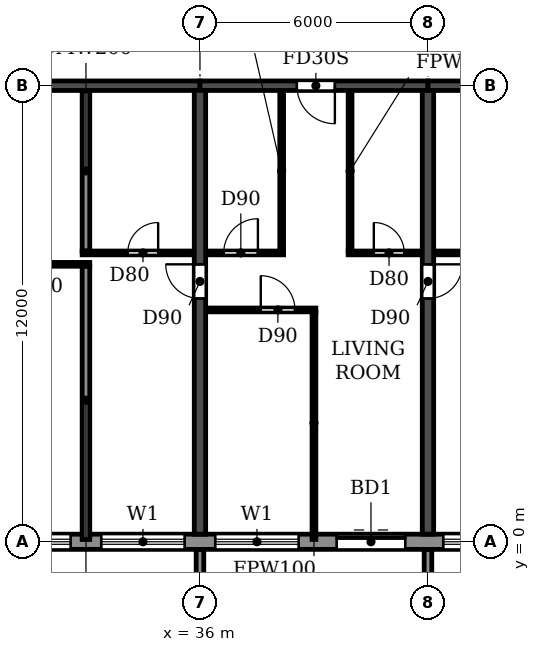
"""IFC4 building model, lengths in metres.
Left out: names, types, materials, properties, quantities, classifications, styles, units other than length and angle.
Written with IfcOpenShell. Run it as: python <this file> out.ifc"""

import sys

from ifc_helpers import new_model, si_unit, direction, frame, frame_2d, origin, place, context, subcontext, project, spatial, polyline, rectangle, outline, extrude, source, transform, mapped, element, fill, save


model = new_model("IFC4")
c1 = context("Model", 3, precision=1e-05, world=origin(), true_north=direction((0.0, 1.0)))
c2 = subcontext(c1, "Body", "Model", "MODEL_VIEW")
j1 = project(units=[si_unit("LENGTHUNIT", "METRE"), si_unit("PLANEANGLEUNIT", "RADIAN")], contexts=[c1])
p1 = place(None, origin())
s1 = spatial("IfcSite", under=j1, at=p1, CompositionType="ELEMENT")
p2 = place(p1, origin())
s2 = spatial("IfcBuilding", under=s1, at=p2, CompositionType="ELEMENT")
p3 = place(p2, frame((0.0, 0.0, 155.4)))
s3 = spatial("IfcBuildingStorey", under=s2, at=p3, CompositionType="ELEMENT", Elevation=155.4)
p4 = place(p3, frame((36.0, 0.2, 0.0), z_axis=(0.0, 0.0, 1.0), x_axis=(0.0, 1.0, 0.0)))
e1 = element("IfcWall", 1, at=p4, inside=s3, PredefinedType="SHEAR", context=c2, shape_type="SweptSolid", body=[
    extrude(rectangle(XDim=11.675, YDim=0.3, at=frame_2d((5.837, 0.0))), origin(), (0.0, 0.0, 1.0), 3.0),
])
p5 = place(p4, frame((6.2, 0.0, 0.0)))
e2 = element("IfcOpeningElement", 2, at=p5, cuts=e1, PredefinedType="OPENING", context=c2, shape_type="SweptSolid", body=[
    extrude(rectangle(XDim=0.9, YDim=2.1, at=frame_2d((0.45, 1.05))), frame((0.0, 0.16, 0.0), z_axis=(0.0, -1.0, 0.0), x_axis=(1.0, 0.0, 0.0)), (0.0, 0.0, 1.0), 0.32),
])
p6 = place(p3, frame((42.0, 0.2, 0.0), z_axis=(0.0, 0.0, 1.0), x_axis=(0.0, 1.0, 0.0)))
e3 = element("IfcWall", 3, at=p6, inside=s3, PredefinedType="SHEAR", context=c2, shape_type="SweptSolid", body=[
    extrude(rectangle(XDim=11.675, YDim=0.3, at=frame_2d((5.837, 0.0))), origin(), (0.0, 0.0, 1.0), 3.0),
])
p7 = place(p6, frame((6.2, 0.0, 0.0)))
e4 = element("IfcOpeningElement", 4, at=p7, cuts=e3, PredefinedType="OPENING", context=c2, shape_type="SweptSolid", body=[
    extrude(rectangle(XDim=0.9, YDim=2.1, at=frame_2d((0.45, 1.05))), frame((0.0, 0.16, 0.0), z_axis=(0.0, -1.0, 0.0), x_axis=(1.0, 0.0, 0.0)), (0.0, 0.0, 1.0), 0.32),
])
p8 = place(p3, frame((30.0, 12.0, 0.0), z_axis=(0.0, 0.0, 1.0), x_axis=(1.0, 0.0, 0.0)))
e5 = element("IfcWall", 5, at=p8, inside=s3, PredefinedType="SHEAR", context=c2, shape_type="SweptSolid", body=[
    extrude(rectangle(XDim=6.0, YDim=0.25, at=frame_2d((3.0, 0.0))), origin(), (0.0, 0.0, 1.0), 2.4),
])
p9 = place(p3, frame((36.0, 12.0, 0.0), z_axis=(0.0, 0.0, 1.0), x_axis=(1.0, 0.0, 0.0)))
e6 = element("IfcWall", 6, at=p9, inside=s3, PredefinedType="SHEAR", context=c2, shape_type="SweptSolid", body=[
    extrude(rectangle(XDim=6.0, YDim=0.25, at=frame_2d((3.0, 0.0))), origin(), (0.0, 0.0, 1.0), 2.4),
])
p10 = place(p9, frame((2.55, 0.0, 0.0)))
e7 = element("IfcOpeningElement", 7, at=p10, cuts=e6, PredefinedType="OPENING", context=c2, shape_type="SweptSolid", body=[
    extrude(rectangle(XDim=1.0, YDim=2.1, at=frame_2d((0.5, 1.05))), frame((0.0, 0.135, 0.0), z_axis=(0.0, -1.0, 0.0), x_axis=(1.0, 0.0, 0.0)), (0.0, 0.0, 1.0), 0.27),
])
p11 = place(p3, frame((42.0, 12.0, 0.0), z_axis=(0.0, 0.0, 1.0), x_axis=(1.0, 0.0, 0.0)))
e8 = element("IfcWall", 8, at=p11, inside=s3, PredefinedType="SHEAR", context=c2, shape_type="SweptSolid", body=[
    extrude(rectangle(XDim=6.0, YDim=0.25, at=frame_2d((3.0, 0.0))), origin(), (0.0, 0.0, 1.0), 2.4),
])
p12 = place(p3, frame((16.683, 0.0, 0.0), z_axis=(0.0, 0.0, 1.0), x_axis=(1.0, 0.0, 0.0)))
e9 = element("IfcWall", 9, at=p12, inside=s3, PredefinedType="STANDARD", context=c2, shape_type="SweptSolid", body=[
    extrude(rectangle(XDim=68.634, YDim=0.4, at=frame_2d((34.317, 0.0))), origin(), (0.0, 0.0, 1.0), 3.0),
])
p13 = place(p12, frame((1.717, 0.0, 0.9)))
e10 = element("IfcOpeningElement", 10, at=p13, cuts=e9, PredefinedType="OPENING", context=c2, shape_type="SweptSolid", body=[
    extrude(rectangle(XDim=2.2, YDim=1.5, at=frame_2d((1.1, 0.75))), frame((0.0, 0.21, 0.0), z_axis=(0.0, -1.0, 0.0), x_axis=(1.0, 0.0, 0.0)), (0.0, 0.0, 1.0), 0.42),
])
p14 = place(p12, frame((4.717, 0.0, 0.9)))
e11 = element("IfcOpeningElement", 11, at=p14, cuts=e9, PredefinedType="OPENING", context=c2, shape_type="SweptSolid", body=[
    extrude(rectangle(XDim=2.2, YDim=1.5, at=frame_2d((1.1, 0.75))), frame((0.0, 0.21, 0.0), z_axis=(0.0, -1.0, 0.0), x_axis=(1.0, 0.0, 0.0)), (0.0, 0.0, 1.0), 0.42),
])
p15 = place(p12, frame((7.917, 0.0, 0.0)))
e12 = element("IfcOpeningElement", 12, at=p15, cuts=e9, PredefinedType="OPENING", context=c2, shape_type="SweptSolid", body=[
    extrude(rectangle(XDim=1.8, YDim=2.4, at=frame_2d((0.9, 1.2))), frame((0.0, 0.21, 0.0), z_axis=(0.0, -1.0, 0.0), x_axis=(1.0, 0.0, 0.0)), (0.0, 0.0, 1.0), 0.42),
])
p16 = place(p12, frame((10.717, 0.0, 0.9)))
e13 = element("IfcOpeningElement", 13, at=p16, cuts=e9, PredefinedType="OPENING", context=c2, shape_type="SweptSolid", body=[
    extrude(rectangle(XDim=2.2, YDim=1.5, at=frame_2d((1.1, 0.75))), frame((0.0, 0.21, 0.0), z_axis=(0.0, -1.0, 0.0), x_axis=(1.0, 0.0, 0.0)), (0.0, 0.0, 1.0), 0.42),
])
p17 = place(p12, frame((13.717, 0.0, 0.9)))
e14 = element("IfcOpeningElement", 14, at=p17, cuts=e9, PredefinedType="OPENING", context=c2, shape_type="SweptSolid", body=[
    extrude(rectangle(XDim=2.2, YDim=1.5, at=frame_2d((1.1, 0.75))), frame((0.0, 0.21, 0.0), z_axis=(0.0, -1.0, 0.0), x_axis=(1.0, 0.0, 0.0)), (0.0, 0.0, 1.0), 0.42),
])
p18 = place(p12, frame((16.717, 0.0, 0.9)))
e15 = element("IfcOpeningElement", 15, at=p18, cuts=e9, PredefinedType="OPENING", context=c2, shape_type="SweptSolid", body=[
    extrude(rectangle(XDim=2.2, YDim=1.5, at=frame_2d((1.1, 0.75))), frame((0.0, 0.21, 0.0), z_axis=(0.0, -1.0, 0.0), x_axis=(1.0, 0.0, 0.0)), (0.0, 0.0, 1.0), 0.42),
])
p19 = place(p12, frame((19.717, 0.0, 0.9)))
e16 = element("IfcOpeningElement", 16, at=p19, cuts=e9, PredefinedType="OPENING", context=c2, shape_type="SweptSolid", body=[
    extrude(rectangle(XDim=2.2, YDim=1.5, at=frame_2d((1.1, 0.75))), frame((0.0, 0.21, 0.0), z_axis=(0.0, -1.0, 0.0), x_axis=(1.0, 0.0, 0.0)), (0.0, 0.0, 1.0), 0.42),
])
p20 = place(p12, frame((22.917, 0.0, 0.0)))
e17 = element("IfcOpeningElement", 17, at=p20, cuts=e9, PredefinedType="OPENING", context=c2, shape_type="SweptSolid", body=[
    extrude(rectangle(XDim=1.8, YDim=2.4, at=frame_2d((0.9, 1.2))), frame((0.0, 0.21, 0.0), z_axis=(0.0, -1.0, 0.0), x_axis=(1.0, 0.0, 0.0)), (0.0, 0.0, 1.0), 0.42),
])
p21 = place(p12, frame((25.717, 0.0, 0.9)))
e18 = element("IfcOpeningElement", 18, at=p21, cuts=e9, PredefinedType="OPENING", context=c2, shape_type="SweptSolid", body=[
    extrude(rectangle(XDim=2.2, YDim=1.5, at=frame_2d((1.1, 0.75))), frame((0.0, 0.21, 0.0), z_axis=(0.0, -1.0, 0.0), x_axis=(1.0, 0.0, 0.0)), (0.0, 0.0, 1.0), 0.42),
])
p22 = place(p12, frame((28.717, 0.0, 0.9)))
e19 = element("IfcOpeningElement", 19, at=p22, cuts=e9, PredefinedType="OPENING", context=c2, shape_type="SweptSolid", body=[
    extrude(rectangle(XDim=2.2, YDim=1.5, at=frame_2d((1.1, 0.75))), frame((0.0, 0.21, 0.0), z_axis=(0.0, -1.0, 0.0), x_axis=(1.0, 0.0, 0.0)), (0.0, 0.0, 1.0), 0.42),
])
p23 = place(p12, frame((31.917, 0.0, 0.0)))
e20 = element("IfcOpeningElement", 20, at=p23, cuts=e9, PredefinedType="OPENING", context=c2, shape_type="SweptSolid", body=[
    extrude(rectangle(XDim=1.8, YDim=2.4, at=frame_2d((0.9, 1.2))), frame((0.0, 0.21, 0.0), z_axis=(0.0, -1.0, 0.0), x_axis=(1.0, 0.0, 0.0)), (0.0, 0.0, 1.0), 0.42),
])
p24 = place(p12, frame((34.717, 0.0, 0.9)))
e21 = element("IfcOpeningElement", 21, at=p24, cuts=e9, PredefinedType="OPENING", context=c2, shape_type="SweptSolid", body=[
    extrude(rectangle(XDim=2.2, YDim=1.5, at=frame_2d((1.1, 0.75))), frame((0.0, 0.21, 0.0), z_axis=(0.0, -1.0, 0.0), x_axis=(1.0, 0.0, 0.0)), (0.0, 0.0, 1.0), 0.42),
])
p25 = place(p12, frame((37.717, 0.0, 0.9)))
e22 = element("IfcOpeningElement", 22, at=p25, cuts=e9, PredefinedType="OPENING", context=c2, shape_type="SweptSolid", body=[
    extrude(rectangle(XDim=2.2, YDim=1.5, at=frame_2d((1.1, 0.75))), frame((0.0, 0.21, 0.0), z_axis=(0.0, -1.0, 0.0), x_axis=(1.0, 0.0, 0.0)), (0.0, 0.0, 1.0), 0.42),
])
p26 = place(p12, frame((40.717, 0.0, 0.9)))
e23 = element("IfcOpeningElement", 23, at=p26, cuts=e9, PredefinedType="OPENING", context=c2, shape_type="SweptSolid", body=[
    extrude(rectangle(XDim=2.2, YDim=1.5, at=frame_2d((1.1, 0.75))), frame((0.0, 0.21, 0.0), z_axis=(0.0, -1.0, 0.0), x_axis=(1.0, 0.0, 0.0)), (0.0, 0.0, 1.0), 0.42),
])
p27 = place(p12, frame((43.717, 0.0, 0.9)))
e24 = element("IfcOpeningElement", 24, at=p27, cuts=e9, PredefinedType="OPENING", context=c2, shape_type="SweptSolid", body=[
    extrude(rectangle(XDim=2.2, YDim=1.5, at=frame_2d((1.1, 0.75))), frame((0.0, 0.21, 0.0), z_axis=(0.0, -1.0, 0.0), x_axis=(1.0, 0.0, 0.0)), (0.0, 0.0, 1.0), 0.42),
])
p28 = place(p12, frame((46.917, 0.0, 0.0)))
e25 = element("IfcOpeningElement", 25, at=p28, cuts=e9, PredefinedType="OPENING", context=c2, shape_type="SweptSolid", body=[
    extrude(rectangle(XDim=1.8, YDim=2.4, at=frame_2d((0.9, 1.2))), frame((0.0, 0.21, 0.0), z_axis=(0.0, -1.0, 0.0), x_axis=(1.0, 0.0, 0.0)), (0.0, 0.0, 1.0), 0.42),
])
p29 = place(p12, frame((49.717, 0.0, 0.9)))
e26 = element("IfcOpeningElement", 26, at=p29, cuts=e9, PredefinedType="OPENING", context=c2, shape_type="SweptSolid", body=[
    extrude(rectangle(XDim=2.2, YDim=1.5, at=frame_2d((1.1, 0.75))), frame((0.0, 0.21, 0.0), z_axis=(0.0, -1.0, 0.0), x_axis=(1.0, 0.0, 0.0)), (0.0, 0.0, 1.0), 0.42),
])
p30 = place(p12, frame((52.717, 0.0, 0.9)))
e27 = element("IfcOpeningElement", 27, at=p30, cuts=e9, PredefinedType="OPENING", context=c2, shape_type="SweptSolid", body=[
    extrude(rectangle(XDim=2.2, YDim=1.5, at=frame_2d((1.1, 0.75))), frame((0.0, 0.21, 0.0), z_axis=(0.0, -1.0, 0.0), x_axis=(1.0, 0.0, 0.0)), (0.0, 0.0, 1.0), 0.42),
])
p31 = place(p12, frame((55.717, 0.0, 0.9)))
e28 = element("IfcOpeningElement", 28, at=p31, cuts=e9, PredefinedType="OPENING", context=c2, shape_type="SweptSolid", body=[
    extrude(rectangle(XDim=2.2, YDim=1.5, at=frame_2d((1.1, 0.75))), frame((0.0, 0.21, 0.0), z_axis=(0.0, -1.0, 0.0), x_axis=(1.0, 0.0, 0.0)), (0.0, 0.0, 1.0), 0.42),
])
p32 = place(p12, frame((58.917, 0.0, 0.0)))
e29 = element("IfcOpeningElement", 29, at=p32, cuts=e9, PredefinedType="OPENING", context=c2, shape_type="SweptSolid", body=[
    extrude(rectangle(XDim=1.8, YDim=2.4, at=frame_2d((0.9, 1.2))), frame((0.0, 0.21, 0.0), z_axis=(0.0, -1.0, 0.0), x_axis=(1.0, 0.0, 0.0)), (0.0, 0.0, 1.0), 0.42),
])
p33 = place(p12, frame((61.717, 0.0, 0.9)))
e30 = element("IfcOpeningElement", 30, at=p33, cuts=e9, PredefinedType="OPENING", context=c2, shape_type="SweptSolid", body=[
    extrude(rectangle(XDim=2.2, YDim=1.5, at=frame_2d((1.1, 0.75))), frame((0.0, 0.21, 0.0), z_axis=(0.0, -1.0, 0.0), x_axis=(1.0, 0.0, 0.0)), (0.0, 0.0, 1.0), 0.42),
])
p34 = place(p12, frame((64.717, 0.0, 0.9)))
e31 = element("IfcOpeningElement", 31, at=p34, cuts=e9, PredefinedType="OPENING", context=c2, shape_type="SweptSolid", body=[
    extrude(rectangle(XDim=2.2, YDim=1.5, at=frame_2d((1.1, 0.75))), frame((0.0, 0.21, 0.0), z_axis=(0.0, -1.0, 0.0), x_axis=(1.0, 0.0, 0.0)), (0.0, 0.0, 1.0), 0.42),
])
m1 = source(origin(), c2, "Body", "SweptSolid", [
    extrude(outline(polyline([(0.0, 0.0), (0.2, 0.0), (0.2, 1.65), (0.0, 1.65), (0.0, 0.0)])), origin(), (0.0, 0.0, 1.0), 3.1),
])
for number, where in (
    (32, (35.9, -1.85, 0.0)),
    (33, (41.9, -1.85, 0.0)),
):
    element("IfcWall", number, at=place(p3, frame(where)), inside=s3, PredefinedType="STANDARD", context=c2, shape_type="MappedRepresentation", body=[
        mapped(m1, transform((0.0, 0.0, 0.0))),
    ])
p35 = place(p3, frame((33.0, 0.06, 0.0), z_axis=(0.0, 0.0, 1.0), x_axis=(0.0, 1.0, 0.0)))
e34 = element("IfcWall", 34, at=p35, inside=s3, PredefinedType="PARTITIONING", context=c2, shape_type="SweptSolid", body=[
    extrude(rectangle(XDim=7.19, YDim=0.2, at=frame_2d((3.595, 0.0))), origin(), (0.0, 0.0, 1.0), 3.0),
])
p36 = place(p3, frame((33.0, 7.65, 0.0), z_axis=(0.0, 0.0, 1.0), x_axis=(0.0, 1.0, 0.0)))
e35 = element("IfcWall", 35, at=p36, inside=s3, PredefinedType="PARTITIONING", context=c2, shape_type="SweptSolid", body=[
    extrude(rectangle(XDim=4.215, YDim=0.2, at=frame_2d((2.107, 0.0))), origin(), (0.0, 0.0, 1.0), 3.0),
])
p37 = place(p3, frame((36.16, 6.1, 0.0), z_axis=(0.0, 0.0, 1.0), x_axis=(1.0, 0.0, 0.0)))
e36 = element("IfcWall", 36, at=p37, inside=s3, PredefinedType="PARTITIONING", context=c2, shape_type="SweptSolid", body=[
    extrude(rectangle(XDim=2.89, YDim=0.1, at=frame_2d((1.445, 0.0))), origin(), (0.0, 0.0, 1.0), 3.0),
])
p38 = place(p37, frame((1.44, 0.0, 0.0)))
e37 = element("IfcOpeningElement", 37, at=p38, cuts=e36, PredefinedType="OPENING", context=c2, shape_type="SweptSolid", body=[
    extrude(rectangle(XDim=0.9, YDim=2.1, at=frame_2d((0.45, 1.05))), frame((0.0, 0.06, 0.0), z_axis=(0.0, -1.0, 0.0), x_axis=(1.0, 0.0, 0.0)), (0.0, 0.0, 1.0), 0.12),
])
p39 = place(p3, frame((30.16, 7.3, 0.0), z_axis=(0.0, 0.0, 1.0), x_axis=(1.0, 0.0, 0.0)))
e38 = element("IfcWall", 38, at=p39, inside=s3, PredefinedType="PARTITIONING", context=c2, shape_type="SweptSolid", body=[
    extrude(rectangle(XDim=2.94, YDim=0.1, at=frame_2d((1.47, 0.0))), origin(), (0.0, 0.0, 1.0), 3.0),
])
p40 = place(p39, frame((0.94, 0.0, 0.0)))
e39 = element("IfcOpeningElement", 39, at=p40, cuts=e38, PredefinedType="OPENING", context=c2, shape_type="SweptSolid", body=[
    extrude(rectangle(XDim=0.8, YDim=2.1, at=frame_2d((0.4, 1.05))), frame((0.0, 0.06, 0.0), z_axis=(0.0, -1.0, 0.0), x_axis=(1.0, 0.0, 0.0)), (0.0, 0.0, 1.0), 0.12),
])
p41 = place(p3, frame((32.9, 7.6, 0.0), z_axis=(0.0, 0.0, 1.0), x_axis=(1.0, 0.0, 0.0)))
e40 = element("IfcWall", 40, at=p41, inside=s3, PredefinedType="PARTITIONING", context=c2, shape_type="SweptSolid", body=[
    extrude(rectangle(XDim=2.94, YDim=0.1, at=frame_2d((1.47, 0.0))), origin(), (0.0, 0.0, 1.0), 3.0),
])
p42 = place(p41, frame((1.2, 0.0, 0.0)))
e41 = element("IfcOpeningElement", 41, at=p42, cuts=e40, PredefinedType="OPENING", context=c2, shape_type="SweptSolid", body=[
    extrude(rectangle(XDim=0.8, YDim=2.1, at=frame_2d((0.4, 1.05))), frame((0.0, 0.06, 0.0), z_axis=(0.0, -1.0, 0.0), x_axis=(1.0, 0.0, 0.0)), (0.0, 0.0, 1.0), 0.12),
])
p43 = place(p3, frame((36.16, 7.6, 0.0), z_axis=(0.0, 0.0, 1.0), x_axis=(1.0, 0.0, 0.0)))
e42 = element("IfcWall", 42, at=p43, inside=s3, PredefinedType="PARTITIONING", context=c2, shape_type="SweptSolid", body=[
    extrude(rectangle(XDim=2.04, YDim=0.1, at=frame_2d((1.02, 0.0))), origin(), (0.0, 0.0, 1.0), 3.0),
])
p44 = place(p43, frame((0.465, 0.0, 0.0)))
e43 = element("IfcOpeningElement", 43, at=p44, cuts=e42, PredefinedType="OPENING", context=c2, shape_type="SweptSolid", body=[
    extrude(rectangle(XDim=0.9, YDim=2.1, at=frame_2d((0.45, 1.05))), frame((0.0, 0.06, 0.0), z_axis=(0.0, -1.0, 0.0), x_axis=(1.0, 0.0, 0.0)), (0.0, 0.0, 1.0), 0.12),
])
p45 = place(p3, frame((39.9, 7.6, 0.0), z_axis=(0.0, 0.0, 1.0), x_axis=(1.0, 0.0, 0.0)))
e44 = element("IfcWall", 44, at=p45, inside=s3, PredefinedType="PARTITIONING", context=c2, shape_type="SweptSolid", body=[
    extrude(rectangle(XDim=1.94, YDim=0.1, at=frame_2d((0.97, 0.0))), origin(), (0.0, 0.0, 1.0), 3.0),
])
p46 = place(p45, frame((0.675, 0.0, 0.0)))
e45 = element("IfcOpeningElement", 45, at=p46, cuts=e44, PredefinedType="OPENING", context=c2, shape_type="SweptSolid", body=[
    extrude(rectangle(XDim=0.8, YDim=2.1, at=frame_2d((0.4, 1.05))), frame((0.0, 0.06, 0.0), z_axis=(0.0, -1.0, 0.0), x_axis=(1.0, 0.0, 0.0)), (0.0, 0.0, 1.0), 0.12),
])
p47 = place(p3, frame((42.16, 7.6, 0.0), z_axis=(0.0, 0.0, 1.0), x_axis=(1.0, 0.0, 0.0)))
e46 = element("IfcWall", 46, at=p47, inside=s3, PredefinedType="PARTITIONING", context=c2, shape_type="SweptSolid", body=[
    extrude(rectangle(XDim=2.74, YDim=0.1, at=frame_2d((1.37, 0.0))), origin(), (0.0, 0.0, 1.0), 3.0),
])
p48 = place(p47, frame((0.94, 0.0, 0.0)))
e47 = element("IfcOpeningElement", 47, at=p48, cuts=e46, PredefinedType="OPENING", context=c2, shape_type="SweptSolid", body=[
    extrude(rectangle(XDim=0.8, YDim=2.1, at=frame_2d((0.4, 1.05))), frame((0.0, 0.06, 0.0), z_axis=(0.0, -1.0, 0.0), x_axis=(1.0, 0.0, 0.0)), (0.0, 0.0, 1.0), 0.12),
])
p49 = place(p3, frame((38.15, 7.65, 0.0), z_axis=(0.0, 0.0, 1.0), x_axis=(0.0, 1.0, 0.0)))
e48 = element("IfcWall", 48, at=p49, inside=s3, PredefinedType="PARTITIONING", context=c2, shape_type="SweptSolid", body=[
    extrude(rectangle(XDim=4.215, YDim=0.1, at=frame_2d((2.107, 0.0))), origin(), (0.0, 0.0, 1.0), 3.0),
])
p50 = place(p3, frame((39.0, 0.06, 0.0), z_axis=(0.0, 0.0, 1.0), x_axis=(0.0, 1.0, 0.0)))
e49 = element("IfcWall", 49, at=p50, inside=s3, PredefinedType="PARTITIONING", context=c2, shape_type="SweptSolid", body=[
    extrude(rectangle(XDim=5.99, YDim=0.1, at=frame_2d((2.995, 0.0))), origin(), (0.0, 0.0, 1.0), 3.0),
])
p51 = place(p3, frame((39.95, 7.65, 0.0), z_axis=(0.0, 0.0, 1.0), x_axis=(0.0, 1.0, 0.0)))
e50 = element("IfcWall", 50, at=p51, inside=s3, PredefinedType="PARTITIONING", context=c2, shape_type="SweptSolid", body=[
    extrude(rectangle(XDim=4.215, YDim=0.1, at=frame_2d((2.107, 0.0))), origin(), (0.0, 0.0, 1.0), 3.0),
])
p52 = place(p17, origin())
e51 = element("IfcWindow", 51, at=p52, inside=s3, PartitioningType="DOUBLE_PANEL_HORIZONTAL", PredefinedType="WINDOW", context=c2, shape_type="SweptSolid", body=[
    extrude(rectangle(XDim=2.2, YDim=1.5, at=frame_2d((1.1, 0.75))), frame((0.0, 0.03, 0.0), z_axis=(0.0, -1.0, 0.0), x_axis=(1.0, 0.0, 0.0)), (0.0, 0.0, 1.0), 0.06),
])
fill(e14, e51)
p53 = place(p18, origin())
e52 = element("IfcWindow", 52, at=p53, inside=s3, PartitioningType="DOUBLE_PANEL_HORIZONTAL", PredefinedType="WINDOW", context=c2, shape_type="SweptSolid", body=[
    extrude(rectangle(XDim=2.2, YDim=1.5, at=frame_2d((1.1, 0.75))), frame((0.0, 0.03, 0.0), z_axis=(0.0, -1.0, 0.0), x_axis=(1.0, 0.0, 0.0)), (0.0, 0.0, 1.0), 0.06),
])
fill(e15, e52)
p54 = place(p19, origin())
e53 = element("IfcWindow", 53, at=p54, inside=s3, PartitioningType="DOUBLE_PANEL_HORIZONTAL", PredefinedType="WINDOW", context=c2, shape_type="SweptSolid", body=[
    extrude(rectangle(XDim=2.2, YDim=1.5, at=frame_2d((1.1, 0.75))), frame((0.0, 0.03, 0.0), z_axis=(0.0, -1.0, 0.0), x_axis=(1.0, 0.0, 0.0)), (0.0, 0.0, 1.0), 0.06),
])
fill(e16, e53)
p55 = place(p20, origin())
e54 = element("IfcDoor", 54, at=p55, inside=s3, OperationType="DOUBLE_DOOR_SLIDING", PredefinedType="DOOR", context=c2, shape_type="SweptSolid", body=[
    extrude(rectangle(XDim=1.8, YDim=2.4, at=frame_2d((0.9, 1.2))), frame((0.0, 0.025, 0.0), z_axis=(0.0, -1.0, 0.0), x_axis=(1.0, 0.0, 0.0)), (0.0, 0.0, 1.0), 0.05),
])
fill(e17, e54)
p56 = place(p21, origin())
e55 = element("IfcWindow", 55, at=p56, inside=s3, PartitioningType="DOUBLE_PANEL_HORIZONTAL", PredefinedType="WINDOW", context=c2, shape_type="SweptSolid", body=[
    extrude(rectangle(XDim=2.2, YDim=1.5, at=frame_2d((1.1, 0.75))), frame((0.0, 0.03, 0.0), z_axis=(0.0, -1.0, 0.0), x_axis=(1.0, 0.0, 0.0)), (0.0, 0.0, 1.0), 0.06),
])
fill(e18, e55)
p57 = place(p42, origin())
e56 = element("IfcDoor", 56, at=p57, inside=s3, OperationType="SINGLE_SWING_RIGHT", PredefinedType="DOOR", context=c2, shape_type="SweptSolid", body=[
    extrude(rectangle(XDim=0.8, YDim=2.1, at=frame_2d((0.4, 1.05))), frame((0.0, 0.025, 0.0), z_axis=(0.0, -1.0, 0.0), x_axis=(1.0, 0.0, 0.0)), (0.0, 0.0, 1.0), 0.05),
])
fill(e41, e56)
p58 = place(p5, origin())
e57 = element("IfcDoor", 57, at=p58, inside=s3, OperationType="SINGLE_SWING_RIGHT", PredefinedType="DOOR", context=c2, shape_type="SweptSolid", body=[
    extrude(rectangle(XDim=0.9, YDim=2.1, at=frame_2d((0.45, 1.05))), frame((0.0, 0.025, 0.0), z_axis=(0.0, -1.0, 0.0), x_axis=(1.0, 0.0, 0.0)), (0.0, 0.0, 1.0), 0.05),
])
fill(e2, e57)
p59 = place(p44, origin())
e58 = element("IfcDoor", 58, at=p59, inside=s3, OperationType="SINGLE_SWING_RIGHT", PredefinedType="DOOR", context=c2, shape_type="SweptSolid", body=[
    extrude(rectangle(XDim=0.9, YDim=2.1, at=frame_2d((0.45, 1.05))), frame((0.0, 0.025, 0.0), z_axis=(0.0, -1.0, 0.0), x_axis=(1.0, 0.0, 0.0)), (0.0, 0.0, 1.0), 0.05),
])
fill(e43, e58)
p60 = place(p38, origin())
e59 = element("IfcDoor", 59, at=p60, inside=s3, OperationType="SINGLE_SWING_LEFT", PredefinedType="DOOR", context=c2, shape_type="SweptSolid", body=[
    extrude(rectangle(XDim=0.9, YDim=2.1, at=frame_2d((0.45, 1.05))), frame((0.0, 0.025, 0.0), z_axis=(0.0, -1.0, 0.0), x_axis=(1.0, 0.0, 0.0)), (0.0, 0.0, 1.0), 0.05),
])
fill(e37, e59)
p61 = place(p10, frame((1.0, 0.0, 0.0), z_axis=(0.0, 0.0, 1.0), x_axis=(-1.0, 0.0, 0.0)))
e60 = element("IfcDoor", 60, at=p61, inside=s3, OperationType="SINGLE_SWING_LEFT", PredefinedType="DOOR", context=c2, shape_type="SweptSolid", body=[
    extrude(rectangle(XDim=1.0, YDim=2.1, at=frame_2d((0.5, 1.05))), frame((0.0, 0.025, 0.0), z_axis=(0.0, -1.0, 0.0), x_axis=(1.0, 0.0, 0.0)), (0.0, 0.0, 1.0), 0.05),
])
fill(e7, e60)
p62 = place(p46, origin())
e61 = element("IfcDoor", 61, at=p62, inside=s3, OperationType="SINGLE_SWING_LEFT", PredefinedType="DOOR", context=c2, shape_type="SweptSolid", body=[
    extrude(rectangle(XDim=0.8, YDim=2.1, at=frame_2d((0.4, 1.05))), frame((0.0, 0.025, 0.0), z_axis=(0.0, -1.0, 0.0), x_axis=(1.0, 0.0, 0.0)), (0.0, 0.0, 1.0), 0.05),
])
fill(e45, e61)
p63 = place(p7, frame((0.9, 0.0, 0.0), z_axis=(0.0, 0.0, 1.0), x_axis=(-1.0, 0.0, 0.0)))
e62 = element("IfcDoor", 62, at=p63, inside=s3, OperationType="SINGLE_SWING_LEFT", PredefinedType="DOOR", context=c2, shape_type="SweptSolid", body=[
    extrude(rectangle(XDim=0.9, YDim=2.1, at=frame_2d((0.45, 1.05))), frame((0.0, 0.025, 0.0), z_axis=(0.0, -1.0, 0.0), x_axis=(1.0, 0.0, 0.0)), (0.0, 0.0, 1.0), 0.05),
])
fill(e4, e62)
save(model, sys.argv[1])
